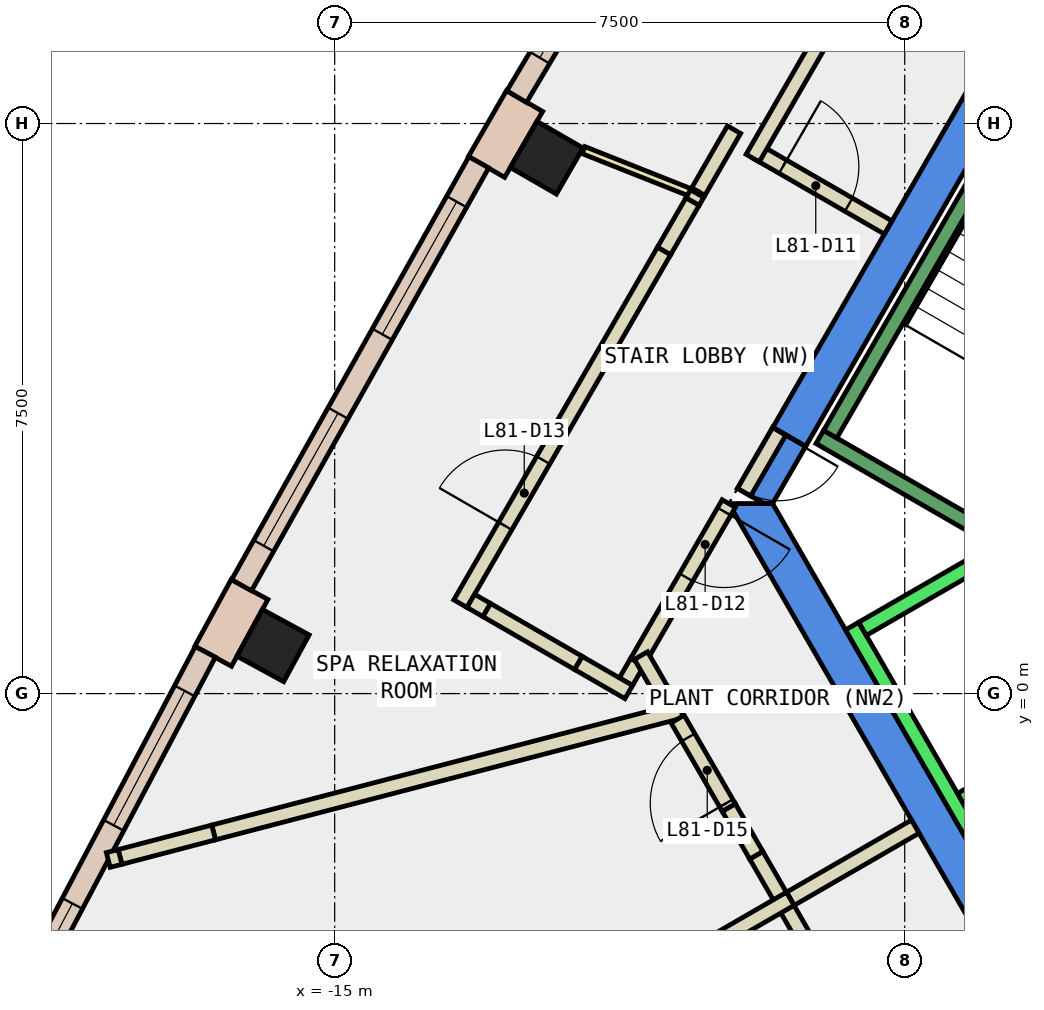
"""IFC4 building model, lengths in metres.
Left out: names, types, materials, properties, quantities, classifications, styles, units other than length and angle.
Written with IfcOpenShell. Run it as: python <this file> out.ifc"""

import sys

from ifc_helpers import new_model, si_unit, direction, frame, frame_2d, origin, origin_2d, place, context, subcontext, project, spatial, polyline, rectangle, outline, extrude, element, fill, save


model = new_model("IFC4")
c1 = context("Model", 3, precision=1e-05, world=origin(), true_north=direction((0.0, 1.0)))
c2 = subcontext(c1, "Body", "Model", "MODEL_VIEW")
j1 = project(units=[si_unit("LENGTHUNIT", "METRE"), si_unit("PLANEANGLEUNIT", "RADIAN")], contexts=[c1])
p1 = place(None, origin())
s1 = spatial("IfcSite", under=j1, at=p1, CompositionType="ELEMENT")
p2 = place(p1, origin())
s2 = spatial("IfcBuilding", under=s1, at=p2, CompositionType="ELEMENT")
p3 = place(p2, frame((0.0, 0.0, 344.9)))
s3 = spatial("IfcBuildingStorey", under=s2, at=p3, CompositionType="ELEMENT", Elevation=344.9)
for number, where, z_axis, x_axis in (
    (1, (-12.211, 7.05, -0.35), (0.0, 0.0, 1.0), (0.5, 0.866, 0.0)),
    (2, (-15.811, 0.632, -0.35), (0.0, 0.0, 1.0), (0.478, 0.878, 0.0)),
):
    element("IfcColumn", number, at=place(p3, frame(where, z_axis=z_axis, x_axis=x_axis)), inside=s3, PredefinedType="COLUMN", context=c2, shape_type="SweptSolid", body=[
        extrude(rectangle(XDim=0.7, YDim=0.7, at=origin_2d()), origin(), (0.0, 0.0, 1.0), 4.4),
    ])
p4 = place(p3, frame((0.0, 0.0, -0.35)))
e3 = element("IfcWall", 3, at=p4, inside=s3, PredefinedType="SHEAR", context=c2, shape_type="SweptSolid", body=[
    extrude(outline(polyline([(-9.236, 3.502), (-8.803, 3.253), (-4.619, 10.5), (-4.907, 11.0), (-9.236, 3.502)])), origin(), (0.0, 0.0, 1.0), 4.4),
])
p5 = place(p3, frame((0.0, 0.0, 3.6)))
e4 = element("IfcWall", 4, at=p5, inside=s3, PredefinedType="SHEAR", context=c2, shape_type="SweptSolid", body=[
    extrude(outline(polyline([(-9.7, 2.7), (-9.354, 2.5), (-9.238, 2.5), (-8.803, 3.253), (-9.236, 3.502), (-9.7, 2.7)])), origin(), (0.0, 0.0, 1.0), 0.45),
])
p6 = place(p3, frame((0.0, 0.0, -0.35)))
e5 = element("IfcWall", 5, at=p6, inside=s3, PredefinedType="SHEAR", context=c2, shape_type="SweptSolid", body=[
    extrude(outline(polyline([(-9.815, 2.5), (-4.907, -6.0), (-4.619, -5.5), (-9.238, 2.5), (-9.815, 2.5)])), origin(), (0.0, 0.0, 1.0), 4.4),
])
p7 = place(p3, frame((-12.502, 7.796, 0.0), z_axis=(0.0, 0.0, 1.0), x_axis=(-0.49960277677, -0.866254619292, 0.0)))
e6 = element("IfcWall", 6, at=p7, inside=s3, PredefinedType="STANDARD", context=c2, shape_type="SweptSolid", body=[
    extrude(rectangle(XDim=1.001, YDim=0.55, at=frame_2d((0.5, 0.0))), origin(), (0.0, 0.0, 1.0), 4.05),
])
p8 = place(p3, frame((-16.12, 1.37, 0.0), z_axis=(0.0, 0.0, 1.0), x_axis=(-0.478442030542, -0.878119139645, 0.0)))
e7 = element("IfcWall", 7, at=p8, inside=s3, PredefinedType="STANDARD", context=c2, shape_type="SweptSolid", body=[
    extrude(rectangle(XDim=1.001, YDim=0.55, at=frame_2d((0.5, 0.0))), origin(), (0.0, 0.0, 1.0), 4.05),
])
p9 = place(p3, frame((-9.347, 13.339, 0.0), z_axis=(0.0, 0.0, 1.0), x_axis=(-0.510686403068, -0.859767060152, 0.0)))
e8 = element("IfcWall", 8, at=p9, inside=s3, PredefinedType="STANDARD", context=c2, shape_type="SweptSolid", body=[
    extrude(rectangle(XDim=6.38, YDim=0.3, at=frame_2d((3.19, 0.0))), origin(), (0.0, 0.0, 1.0), 4.05),
])
p10 = place(p9, frame((0.595, 0.0, 0.9)))
e9 = element("IfcOpeningElement", 9, at=p10, cuts=e8, PredefinedType="OPENING", context=c2, shape_type="SweptSolid", body=[
    extrude(rectangle(XDim=2.0, YDim=3.0, at=frame_2d((1.0, 1.5))), frame((0.0, 0.16, 0.0), z_axis=(0.0, -1.0, 0.0), x_axis=(1.0, 0.0, 0.0)), (0.0, 0.0, 1.0), 0.32),
])
p11 = place(p9, frame((3.785, 0.0, 0.9)))
e10 = element("IfcOpeningElement", 10, at=p11, cuts=e8, PredefinedType="OPENING", context=c2, shape_type="SweptSolid", body=[
    extrude(rectangle(XDim=2.0, YDim=3.0, at=frame_2d((1.0, 1.5))), frame((0.0, 0.16, 0.0), z_axis=(0.0, -1.0, 0.0), x_axis=(1.0, 0.0, 0.0)), (0.0, 0.0, 1.0), 0.32),
])
p12 = place(p3, frame((-13.104, 6.99, 0.0), z_axis=(0.0, 0.0, 1.0), x_axis=(-0.489232514948, -0.872153396094, 0.0)))
e11 = element("IfcWall", 11, at=p12, inside=s3, PredefinedType="STANDARD", context=c2, shape_type="SweptSolid", body=[
    extrude(rectangle(XDim=6.38, YDim=0.3, at=frame_2d((3.19, 0.0))), origin(), (0.0, 0.0, 1.0), 4.05),
])
p13 = place(p12, frame((0.595, 0.0, 0.9)))
e12 = element("IfcOpeningElement", 12, at=p13, cuts=e11, PredefinedType="OPENING", context=c2, shape_type="SweptSolid", body=[
    extrude(rectangle(XDim=2.0, YDim=3.0, at=frame_2d((1.0, 1.5))), frame((0.0, 0.16, 0.0), z_axis=(0.0, -1.0, 0.0), x_axis=(1.0, 0.0, 0.0)), (0.0, 0.0, 1.0), 0.32),
])
p14 = place(p12, frame((3.785, 0.0, 0.9)))
e13 = element("IfcOpeningElement", 13, at=p14, cuts=e11, PredefinedType="OPENING", context=c2, shape_type="SweptSolid", body=[
    extrude(rectangle(XDim=2.0, YDim=3.0, at=frame_2d((1.0, 1.5))), frame((0.0, 0.16, 0.0), z_axis=(0.0, -1.0, 0.0), x_axis=(1.0, 0.0, 0.0)), (0.0, 0.0, 1.0), 0.32),
])
p15 = place(p3, frame((-16.702, 0.549, 0.0), z_axis=(0.0, 0.0, 1.0), x_axis=(-0.467155191513, -0.884175337274, 0.0)))
e14 = element("IfcWall", 14, at=p15, inside=s3, PredefinedType="STANDARD", context=c2, shape_type="SweptSolid", body=[
    extrude(rectangle(XDim=6.326, YDim=0.3, at=frame_2d((3.163, 0.0))), origin(), (0.0, 0.0, 1.0), 4.05),
])
p16 = place(p15, frame((0.581, 0.0, 0.9)))
e15 = element("IfcOpeningElement", 15, at=p16, cuts=e14, PredefinedType="OPENING", context=c2, shape_type="SweptSolid", body=[
    extrude(rectangle(XDim=2.0, YDim=3.0, at=frame_2d((1.0, 1.5))), frame((0.0, 0.16, 0.0), z_axis=(0.0, -1.0, 0.0), x_axis=(1.0, 0.0, 0.0)), (0.0, 0.0, 1.0), 0.32),
])
p17 = place(p15, frame((3.744, 0.0, 0.9)))
e16 = element("IfcOpeningElement", 16, at=p17, cuts=e14, PredefinedType="OPENING", context=c2, shape_type="SweptSolid", body=[
    extrude(rectangle(XDim=2.0, YDim=3.0, at=frame_2d((1.0, 1.5))), frame((0.0, 0.16, 0.0), z_axis=(0.0, -1.0, 0.0), x_axis=(1.0, 0.0, 0.0)), (0.0, 0.0, 1.0), 0.32),
])
p18 = place(p3, frame((-9.006, -2.7, 0.0), z_axis=(0.0, 0.0, 1.0), x_axis=(0.865980106173, 0.500078449558, 0.0)))
e17 = element("IfcWall", 17, at=p18, inside=s3, PredefinedType="PARTITIONING", context=c2, shape_type="SweptSolid", body=[
    extrude(rectangle(XDim=1.9, YDim=0.2, at=frame_2d((0.95, 0.0))), origin(), (0.0, 0.0, 1.0), 4.05),
])
p19 = place(p3, frame((-9.45, 7.132, 0.0), z_axis=(0.0, 0.0, 1.0), x_axis=(0.866010750942, -0.50002537861, 0.0)))
e18 = element("IfcWall", 18, at=p19, inside=s3, PredefinedType="PARTITIONING", context=c2, shape_type="SweptSolid", body=[
    extrude(rectangle(XDim=2.0, YDim=0.2, at=frame_2d((1.0, 0.0))), origin(), (0.0, 0.0, 1.0), 4.05),
])
p20 = place(p19, frame((0.4, 0.0, 0.0)))
e19 = element("IfcOpeningElement", 19, at=p20, cuts=e18, PredefinedType="OPENING", context=c2, shape_type="SweptSolid", body=[
    extrude(rectangle(XDim=1.0, YDim=2.1, at=frame_2d((0.5, 1.05))), frame((0.0, 0.11, 0.0), z_axis=(0.0, -1.0, 0.0), x_axis=(1.0, 0.0, 0.0)), (0.0, 0.0, 1.0), 0.22),
])
p21 = place(p3, frame((-9.815, 2.5, 0.0), z_axis=(0.0, 0.0, 1.0), x_axis=(-0.500061536317, -0.86598987286, 0.0)))
e20 = element("IfcWall", 20, at=p21, inside=s3, PredefinedType="PARTITIONING", context=c2, shape_type="SweptSolid", body=[
    extrude(rectangle(XDim=2.41, YDim=0.2, at=frame_2d((1.205, 0.0))), origin(), (0.0, 0.0, 1.0), 4.05),
])
p22 = place(p21, frame((0.121, 0.0, 0.0)))
e21 = element("IfcOpeningElement", 21, at=p22, cuts=e20, PredefinedType="OPENING", context=c2, shape_type="SweptSolid", body=[
    extrude(rectangle(XDim=1.0, YDim=2.1, at=frame_2d((0.5, 1.05))), frame((0.0, 0.11, 0.0), z_axis=(0.0, -1.0, 0.0), x_axis=(1.0, 0.0, 0.0)), (0.0, 0.0, 1.0), 0.22),
])
p23 = place(p3, frame((-11.02, 0.413, 0.0), z_axis=(0.0, 0.0, 1.0), x_axis=(-0.500222587251, -0.865896854829, 0.0)))
e22 = element("IfcWall", 22, at=p23, inside=s3, PredefinedType="PARTITIONING", context=c2, shape_type="SweptSolid", body=[
    extrude(rectangle(XDim=0.296, YDim=0.2, at=frame_2d((0.148, 0.0))), origin(), (0.0, 0.0, 1.0), 4.05),
])
p24 = place(p3, frame((-11.131, 0.02, 0.0), z_axis=(0.0, 0.0, 1.0), x_axis=(-0.865586075524, 0.500760168003, 0.0)))
e23 = element("IfcWall", 23, at=p24, inside=s3, PredefinedType="PARTITIONING", context=c2, shape_type="SweptSolid", body=[
    extrude(rectangle(XDim=0.767, YDim=0.2, at=frame_2d((0.383, 0.0))), origin(), (0.0, 0.0, 1.0), 4.05),
])
p25 = place(p3, frame((-13.346, 1.183, 0.0), z_axis=(0.0, 0.0, 1.0), x_axis=(0.500073414727, 0.865983013623, 0.0)))
e24 = element("IfcWall", 24, at=p25, inside=s3, PredefinedType="PARTITIONING", context=c2, shape_type="SweptSolid", body=[
    extrude(rectangle(XDim=5.359, YDim=0.2, at=frame_2d((2.68, 0.0))), origin(), (0.0, 0.0, 1.0), 4.05),
])
p26 = place(p25, frame((1.18, 0.0, 0.0)))
e25 = element("IfcOpeningElement", 25, at=p26, cuts=e24, PredefinedType="OPENING", context=c2, shape_type="SweptSolid", body=[
    extrude(rectangle(XDim=1.0, YDim=2.1, at=frame_2d((0.5, 1.05))), frame((0.0, 0.11, 0.0), z_axis=(0.0, -1.0, 0.0), x_axis=(1.0, 0.0, 0.0)), (0.0, 0.0, 1.0), 0.22),
])
p27 = place(p3, frame((-10.216, 6.604, 0.0), z_axis=(0.0, 0.0, 1.0), x_axis=(0.499572668549, 0.866271983178, 0.0)))
e26 = element("IfcWall", 26, at=p27, inside=s3, PredefinedType="PARTITIONING", context=c2, shape_type="SweptSolid", body=[
    extrude(rectangle(XDim=0.941, YDim=0.2, at=frame_2d((0.47, 0.0))), origin(), (0.0, 0.0, 1.0), 4.05),
])
p28 = place(p3, frame((-9.5, 7.045, 0.0), z_axis=(0.0, 0.0, 1.0), x_axis=(0.500052367415, 0.865995167332, 0.0)))
e27 = element("IfcWall", 27, at=p28, inside=s3, PredefinedType="PARTITIONING", context=c2, shape_type="SweptSolid", body=[
    extrude(rectangle(XDim=4.569, YDim=0.2, at=frame_2d((2.285, 0.0))), origin(), (0.0, 0.0, 1.0), 4.05),
])
p29 = place(p3, frame((-10.588, -0.161, 0.0), z_axis=(0.0, 0.0, 1.0), x_axis=(-0.500506694522, 0.865732665861, 0.0)))
e28 = element("IfcWall", 28, at=p29, inside=s3, PredefinedType="PARTITIONING", context=c2, shape_type="SweptSolid", body=[
    extrude(rectangle(XDim=0.763, YDim=0.2, at=frame_2d((0.382, 0.0))), origin(), (0.0, 0.0, 1.0), 4.05),
])
p30 = place(p3, frame((-9.093, -2.75, 0.0), z_axis=(0.0, 0.0, 1.0), x_axis=(-0.500153222552, 0.865936922628, 0.0)))
e29 = element("IfcWall", 29, at=p30, inside=s3, PredefinedType="PARTITIONING", context=c2, shape_type="SweptSolid", body=[
    extrude(rectangle(XDim=0.719, YDim=0.2, at=frame_2d((0.36, 0.0))), origin(), (0.0, 0.0, 1.0), 4.05),
])
p31 = place(p3, frame((-11.726, 7.15, 0.0), z_axis=(0.0, 0.0, 1.0), x_axis=(0.929589639936, -0.36859612223, 0.0)))
e30 = element("IfcWall", 30, at=p31, inside=s3, PredefinedType="PARTITIONING", context=c2, shape_type="SweptSolid", body=[
    extrude(rectangle(XDim=1.598, YDim=0.1, at=frame_2d((0.799, 0.0))), origin(), (0.0, 0.0, 1.0), 1.95),
])
p32 = place(p3, frame((-10.441, -0.223, 0.0), z_axis=(0.0, 0.0, 1.0), x_axis=(-0.967651517998, -0.252290585866, 0.0)))
e31 = element("IfcWall", 31, at=p32, inside=s3, PredefinedType="PARTITIONING", context=c2, shape_type="SweptSolid", body=[
    extrude(rectangle(XDim=6.358, YDim=0.2, at=frame_2d((3.179, 0.0))), origin(), (0.0, 0.0, 1.0), 4.05),
])
p33 = place(p3, frame((-9.15, 3.452, 0.0), z_axis=(0.0, 0.0, 1.0), x_axis=(-0.500079945886, -0.865979242085, 0.0)))
e32 = element("IfcWall", 32, at=p33, inside=s3, PredefinedType="PARTITIONING", context=c2, shape_type="SweptSolid", body=[
    extrude(rectangle(XDim=0.926, YDim=0.2, at=frame_2d((0.463, 0.0))), origin(), (0.0, 0.0, 1.0), 2.4),
])
p34 = place(p33, frame((0.017, 0.0, 0.0)))
e33 = element("IfcOpeningElement", 33, at=p34, cuts=e32, PredefinedType="OPENING", context=c2, shape_type="SweptSolid", body=[
    extrude(rectangle(XDim=0.9, YDim=2.1, at=frame_2d((0.45, 1.05))), frame((0.0, 0.11, 0.0), z_axis=(0.0, -1.0, 0.0), x_axis=(1.0, 0.0, 0.0)), (0.0, 0.0, 1.0), 0.22),
])
p35 = place(p3, frame((-8.185, -4.322, 0.0), z_axis=(0.0, 0.0, 1.0), x_axis=(-0.500145398563, 0.865941441609, 0.0)))
e34 = element("IfcWall", 34, at=p35, inside=s3, PredefinedType="PARTITIONING", context=c2, shape_type="SweptSolid", body=[
    extrude(rectangle(XDim=1.815, YDim=0.2, at=frame_2d((0.908, 0.0))), origin(), (0.0, 0.0, 1.0), 4.05),
])
p36 = place(p3, frame((-18.407, -8.127, 0.0), z_axis=(0.0, 0.0, 1.0), x_axis=(0.866049258168, 0.49995868072, 0.0)))
e35 = element("IfcWall", 35, at=p36, inside=s3, PredefinedType="PARTITIONING", context=c2, shape_type="SweptSolid", body=[
    extrude(rectangle(XDim=10.855, YDim=0.2, at=frame_2d((5.427, 0.0))), origin(), (0.0, 0.0, 1.0), 4.05),
])
p37 = place(p3, frame((-11.795, 0.404, 0.0), z_axis=(0.0, 0.0, 1.0), x_axis=(-0.866109685849, 0.49985399076, 0.0)))
e36 = element("IfcWall", 36, at=p37, inside=s3, PredefinedType="PARTITIONING", context=c2, shape_type="SweptSolid", body=[
    extrude(rectangle(XDim=1.393, YDim=0.2, at=frame_2d((0.696, 0.0))), origin(), (0.0, 0.0, 1.0), 1.95),
])
p38 = place(p3, frame((-13.001, 1.1, 0.0), z_axis=(0.0, 0.0, 1.0), x_axis=(-0.866422508423, 0.499311562953, 0.0)))
e37 = element("IfcWall", 37, at=p38, inside=s3, PredefinedType="PARTITIONING", context=c2, shape_type="SweptSolid", body=[
    extrude(rectangle(XDim=0.24, YDim=0.2, at=frame_2d((0.12, 0.0))), origin(), (0.0, 0.0, 1.0), 4.05),
])
p39 = place(p3, frame((-10.666, 5.824, 0.0), z_axis=(0.0, 0.0, 1.0), x_axis=(0.499637970844, 0.866234320545, 0.0)))
e38 = element("IfcWall", 38, at=p39, inside=s3, PredefinedType="PARTITIONING", context=c2, shape_type="SweptSolid", body=[
    extrude(rectangle(XDim=0.75, YDim=0.2, at=frame_2d((0.375, 0.0))), origin(), (0.0, 0.0, 1.0), 1.95),
])
p40 = place(p3, frame((-10.291, 6.474, 0.0), z_axis=(0.0, 0.0, 1.0), x_axis=(0.500955995102, 0.865472755765, 0.0)))
e39 = element("IfcWall", 39, at=p40, inside=s3, PredefinedType="PARTITIONING", context=c2, shape_type="SweptSolid", body=[
    extrude(rectangle(XDim=0.12, YDim=0.2, at=frame_2d((0.06, 0.0))), origin(), (0.0, 0.0, 1.0), 4.05),
])
p41 = place(p3, frame((-9.453, -2.127, 0.0), z_axis=(0.0, 0.0, 1.0), x_axis=(-0.499508606083, 0.866308924373, 0.0)))
e40 = element("IfcWall", 40, at=p41, inside=s3, PredefinedType="PARTITIONING", context=c2, shape_type="SweptSolid", body=[
    extrude(rectangle(XDim=0.725, YDim=0.2, at=frame_2d((0.362, 0.0))), origin(), (0.0, 0.0, 1.0), 1.95),
])
p42 = place(p3, frame((-9.815, -1.499, 0.0), z_axis=(0.0, 0.0, 1.0), x_axis=(-0.50057098838, 0.865695492418, 0.0)))
e41 = element("IfcWall", 41, at=p42, inside=s3, PredefinedType="PARTITIONING", context=c2, shape_type="SweptSolid", body=[
    extrude(rectangle(XDim=1.345, YDim=0.2, at=frame_2d((0.672, 0.0))), origin(), (0.0, 0.0, 1.0), 4.05),
])
p43 = place(p42, frame((0.066, 0.0, 0.0)))
e42 = element("IfcOpeningElement", 42, at=p43, cuts=e41, PredefinedType="OPENING", context=c2, shape_type="SweptSolid", body=[
    extrude(rectangle(XDim=1.0, YDim=2.1, at=frame_2d((0.5, 1.05))), frame((0.0, 0.11, 0.0), z_axis=(0.0, -1.0, 0.0), x_axis=(1.0, 0.0, 0.0)), (0.0, 0.0, 1.0), 0.22),
])
p44 = place(p3, frame((-16.593, -1.827, 0.0), z_axis=(0.0, 0.0, 1.0), x_axis=(-0.96744384591, -0.253085766116, 0.0)))
e43 = element("IfcWall", 43, at=p44, inside=s3, PredefinedType="PARTITIONING", context=c2, shape_type="SweptSolid", body=[
    extrude(rectangle(XDim=1.272, YDim=0.2, at=frame_2d((0.636, 0.0))), origin(), (0.0, 0.0, 1.0), 1.95),
])
p45 = place(p3, frame((-17.824, -2.149, 0.0), z_axis=(0.0, 0.0, 1.0), x_axis=(-0.968229703527, -0.250062474612, 0.0)))
e44 = element("IfcWall", 44, at=p45, inside=s3, PredefinedType="PARTITIONING", context=c2, shape_type="SweptSolid", body=[
    extrude(rectangle(XDim=0.16, YDim=0.2, at=frame_2d((0.08, 0.0))), origin(), (0.0, 0.0, 1.0), 4.05),
])
p46 = place(p3, frame((-8.192, 0.888, 0.0), z_axis=(0.0, 0.0, 1.0), x_axis=(0.500034260056, -0.866005622828, 0.0)))
e45 = element("IfcWall", 45, at=p46, inside=s3, PredefinedType="STANDARD", context=c2, shape_type="SweptSolid", body=[
    extrude(rectangle(XDim=5.399, YDim=0.2, at=frame_2d((2.7, 0.0))), origin(), (0.0, 0.0, 1.0), 4.05),
])
for number, where, z_axis, x_axis in (
    (46, (-5.977, 2.052, 0.0), (0.0, 0.0, 1.0), (-0.866, -0.5, 0.0)),
    (47, (-4.677, -0.2, 0.0), (0.0, 0.0, 1.0), (-0.866, -0.5, 0.0)),
):
    element("IfcWall", number, at=place(p3, frame(where, z_axis=z_axis, x_axis=x_axis)), inside=s3, PredefinedType="STANDARD", context=c2, shape_type="SweptSolid", body=[
        extrude(rectangle(XDim=2.399, YDim=0.2, at=frame_2d((1.2, 0.0))), origin(), (0.0, 0.0, 1.0), 4.05),
    ])
p47 = place(p3, frame((-6.25, 2.01, 0.0), z_axis=(0.0, 0.0, 1.0), x_axis=(-0.86611865017, 0.499838457731, 0.0)))
e48 = element("IfcWall", 48, at=p47, inside=s3, PredefinedType="STANDARD", context=c2, shape_type="SweptSolid", body=[
    extrude(rectangle(XDim=2.733, YDim=0.2, at=frame_2d((1.366, 0.0))), origin(), (0.0, 0.0, 1.0), 4.05),
])
p48 = place(p3, frame((-5.03, 9.388, 0.0), z_axis=(0.0, 0.0, 1.0), x_axis=(-0.499978703459, -0.866037698999, 0.0)))
e49 = element("IfcWall", 49, at=p48, inside=s3, PredefinedType="STANDARD", context=c2, shape_type="SweptSolid", body=[
    extrude(rectangle(XDim=6.9, YDim=0.2, at=frame_2d((3.45, 0.0))), origin(), (0.0, 0.0, 1.0), 4.05),
])
p49 = place(p11, origin())
e50 = element("IfcWindow", 50, at=p49, inside=s3, PartitioningType="SINGLE_PANEL", PredefinedType="WINDOW", context=c2, shape_type="SweptSolid", body=[
    extrude(rectangle(XDim=2.0, YDim=3.0, at=frame_2d((1.0, 1.5))), frame((0.0, 0.03, 0.0), z_axis=(0.0, -1.0, 0.0), x_axis=(1.0, 0.0, 0.0)), (0.0, 0.0, 1.0), 0.06),
])
fill(e10, e50)
p50 = place(p13, origin())
e51 = element("IfcWindow", 51, at=p50, inside=s3, PartitioningType="SINGLE_PANEL", PredefinedType="WINDOW", context=c2, shape_type="SweptSolid", body=[
    extrude(rectangle(XDim=2.0, YDim=3.0, at=frame_2d((1.0, 1.5))), frame((0.0, 0.03, 0.0), z_axis=(0.0, -1.0, 0.0), x_axis=(1.0, 0.0, 0.0)), (0.0, 0.0, 1.0), 0.06),
])
fill(e12, e51)
p51 = place(p14, origin())
e52 = element("IfcWindow", 52, at=p51, inside=s3, PartitioningType="SINGLE_PANEL", PredefinedType="WINDOW", context=c2, shape_type="SweptSolid", body=[
    extrude(rectangle(XDim=2.0, YDim=3.0, at=frame_2d((1.0, 1.5))), frame((0.0, 0.03, 0.0), z_axis=(0.0, -1.0, 0.0), x_axis=(1.0, 0.0, 0.0)), (0.0, 0.0, 1.0), 0.06),
])
fill(e13, e52)
p52 = place(p16, origin())
e53 = element("IfcWindow", 53, at=p52, inside=s3, PartitioningType="SINGLE_PANEL", PredefinedType="WINDOW", context=c2, shape_type="SweptSolid", body=[
    extrude(rectangle(XDim=2.0, YDim=3.0, at=frame_2d((1.0, 1.5))), frame((0.0, 0.03, 0.0), z_axis=(0.0, -1.0, 0.0), x_axis=(1.0, 0.0, 0.0)), (0.0, 0.0, 1.0), 0.06),
])
fill(e15, e53)
p53 = place(p17, origin())
e54 = element("IfcWindow", 54, at=p53, inside=s3, PartitioningType="SINGLE_PANEL", PredefinedType="WINDOW", context=c2, shape_type="SweptSolid", body=[
    extrude(rectangle(XDim=2.0, YDim=3.0, at=frame_2d((1.0, 1.5))), frame((0.0, 0.03, 0.0), z_axis=(0.0, -1.0, 0.0), x_axis=(1.0, 0.0, 0.0)), (0.0, 0.0, 1.0), 0.06),
])
fill(e16, e54)
p54 = place(p20, origin())
e55 = element("IfcDoor", 55, at=p54, inside=s3, OperationType="SINGLE_SWING_LEFT", PredefinedType="DOOR", context=c2, shape_type="SweptSolid", body=[
    extrude(rectangle(XDim=1.0, YDim=2.1, at=frame_2d((0.5, 1.05))), frame((0.0, 0.025, 0.0), z_axis=(0.0, -1.0, 0.0), x_axis=(1.0, 0.0, 0.0)), (0.0, 0.0, 1.0), 0.05),
])
fill(e19, e55)
p55 = place(p22, origin())
e56 = element("IfcDoor", 56, at=p55, inside=s3, OperationType="SINGLE_SWING_RIGHT", PredefinedType="DOOR", context=c2, shape_type="SweptSolid", body=[
    extrude(rectangle(XDim=1.0, YDim=2.1, at=frame_2d((0.5, 1.05))), frame((0.0, 0.025, 0.0), z_axis=(0.0, -1.0, 0.0), x_axis=(1.0, 0.0, 0.0)), (0.0, 0.0, 1.0), 0.05),
])
fill(e21, e56)
p56 = place(p26, origin())
e57 = element("IfcDoor", 57, at=p56, inside=s3, OperationType="SINGLE_SWING_LEFT", PredefinedType="DOOR", context=c2, shape_type="SweptSolid", body=[
    extrude(rectangle(XDim=1.0, YDim=2.1, at=frame_2d((0.5, 1.05))), frame((0.0, 0.025, 0.0), z_axis=(0.0, -1.0, 0.0), x_axis=(1.0, 0.0, 0.0)), (0.0, 0.0, 1.0), 0.05),
])
fill(e25, e57)
p57 = place(p43, origin())
e58 = element("IfcDoor", 58, at=p57, inside=s3, OperationType="SINGLE_SWING_LEFT", PredefinedType="DOOR", context=c2, shape_type="SweptSolid", body=[
    extrude(rectangle(XDim=1.0, YDim=2.1, at=frame_2d((0.5, 1.05))), frame((0.0, 0.025, 0.0), z_axis=(0.0, -1.0, 0.0), x_axis=(1.0, 0.0, 0.0)), (0.0, 0.0, 1.0), 0.05),
])
fill(e42, e58)
p58 = place(p34, origin())
e59 = element("IfcDoor", 59, at=p58, inside=s3, OperationType="SINGLE_SWING_LEFT", PredefinedType="DOOR", context=c2, shape_type="SweptSolid", body=[
    extrude(rectangle(XDim=0.9, YDim=2.1, at=frame_2d((0.45, 1.05))), frame((0.0, 0.025, 0.0), z_axis=(0.0, -1.0, 0.0), x_axis=(1.0, 0.0, 0.0)), (0.0, 0.0, 1.0), 0.05),
])
fill(e33, e59)
save(model, sys.argv[1])
